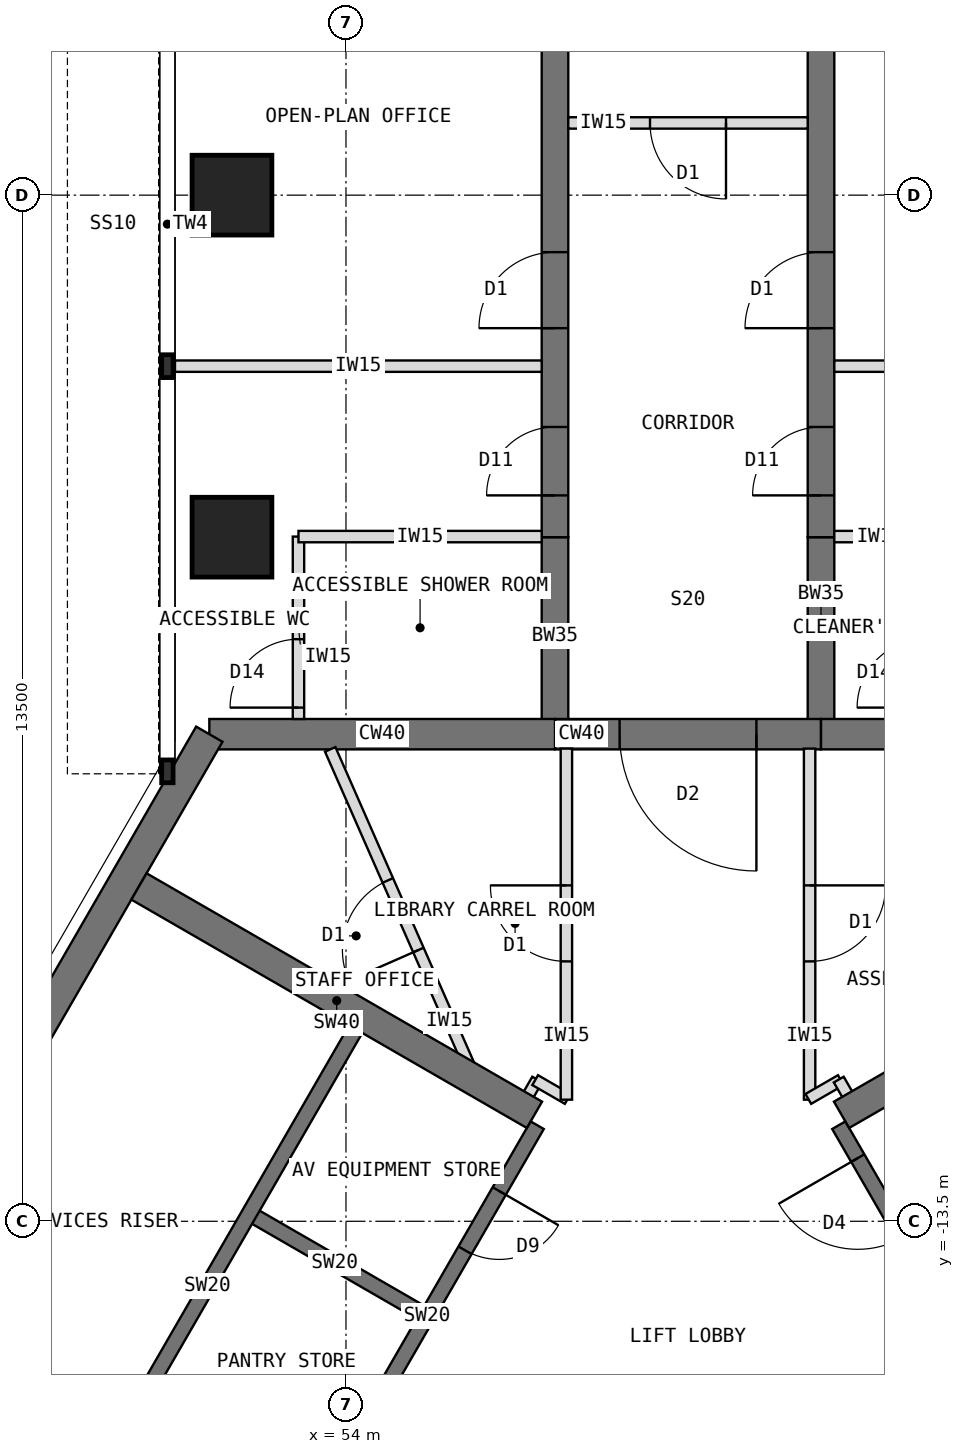
"""IFC4 building model, lengths in metres.
Left out: names, types, materials, properties, quantities, classifications, styles, units other than length and angle.
Written with IfcOpenShell. Run it as: python <this file> out.ifc"""

import sys

from ifc_helpers import new_model, si_unit, direction, frame, frame_2d, origin, origin_2d, place, context, subcontext, project, spatial, rectangle, extrude, element, fill, save


model = new_model("IFC4")
c1 = context("Model", 3, precision=1e-05, world=origin(), true_north=direction((0.0, 1.0)))
c2 = subcontext(c1, "Body", "Model", "MODEL_VIEW")
j1 = project(units=[si_unit("LENGTHUNIT", "METRE"), si_unit("PLANEANGLEUNIT", "RADIAN")], contexts=[c1])
p1 = place(None, origin())
s1 = spatial("IfcSite", under=j1, at=p1, CompositionType="ELEMENT")
p2 = place(p1, origin())
s2 = spatial("IfcBuilding", under=s1, at=p2, CompositionType="ELEMENT")
p3 = place(p2, frame((0.0, 0.0, 255.5)))
s3 = spatial("IfcBuildingStorey", under=s2, at=p3, CompositionType="ELEMENT", Elevation=255.5)
p4 = place(p3, frame((64.798, -7.092, 0.0), z_axis=(0.0, 0.0, 1.0), x_axis=(-1.0, 0.0, 0.0)))
e1 = element("IfcWall", 1, at=p4, inside=s3, PredefinedType="SHEAR", context=c2, shape_type="SweptSolid", body=[
    extrude(rectangle(XDim=4.548, YDim=0.4, at=frame_2d((2.274, 0.0))), origin(), (0.0, 0.0, 1.0), 4.0),
])
p5 = place(p3, frame((60.25, -7.092, 0.0), z_axis=(0.0, 0.0, 1.0), x_axis=(-1.0, 0.0, 0.0)))
e2 = element("IfcWall", 2, at=p5, inside=s3, PredefinedType="SHEAR", context=c2, shape_type="SweptSolid", body=[
    extrude(rectangle(XDim=3.5, YDim=0.4, at=frame_2d((1.75, 0.0))), origin(), (0.0, 0.0, 1.0), 4.0),
])
p6 = place(p5, frame((0.85, 0.0, 0.0)))
e3 = element("IfcOpeningElement", 3, at=p6, cuts=e2, PredefinedType="OPENING", context=c2, shape_type="SweptSolid", body=[
    extrude(rectangle(XDim=1.8, YDim=2.1, at=frame_2d((0.9, 1.05))), frame((0.0, 0.21, 0.0), z_axis=(0.0, -1.0, 0.0), x_axis=(1.0, 0.0, 0.0)), (0.0, 0.0, 1.0), 0.42),
])
p7 = place(p3, frame((56.75, -7.092, 0.0), z_axis=(0.0, 0.0, 1.0), x_axis=(-1.0, 0.0, 0.0)))
e4 = element("IfcWall", 4, at=p7, inside=s3, PredefinedType="SHEAR", context=c2, shape_type="SweptSolid", body=[
    extrude(rectangle(XDim=4.548, YDim=0.4, at=frame_2d((2.274, 0.0))), origin(), (0.0, 0.0, 1.0), 4.0),
])
p8 = place(p3, frame((52.202, -7.092, 0.0), z_axis=(0.0, 0.0, 1.0), x_axis=(-0.500005998175, -0.866021940709, 0.0)))
e5 = element("IfcWall", 5, at=p8, inside=s3, PredefinedType="SHEAR", context=c2, shape_type="SweptSolid", body=[
    extrude(rectangle(XDim=12.596, YDim=0.4, at=frame_2d((6.298, 0.0))), origin(), (0.0, 0.0, 1.0), 4.0),
])
p9 = place(p3, frame((56.75, -7.092, 0.0), z_axis=(0.0, 0.0, 1.0), x_axis=(0.0, 1.0, 0.0)))
e6 = element("IfcWall", 6, at=p9, inside=s3, PredefinedType="SHEAR", context=c2, shape_type="SweptSolid", body=[
    extrude(rectangle(XDim=2.592, YDim=0.35, at=frame_2d((1.296, 0.0))), origin(), (0.0, 0.0, 1.0), 4.0),
])
p10 = place(p3, frame((56.75, -4.5, 0.0), z_axis=(0.0, 0.0, 1.0), x_axis=(0.0, 1.0, 0.0)))
e7 = element("IfcWall", 7, at=p10, inside=s3, PredefinedType="SHEAR", context=c2, shape_type="SweptSolid", body=[
    extrude(rectangle(XDim=13.2, YDim=0.35, at=frame_2d((6.6, 0.0))), origin(), (0.0, 0.0, 1.0), 4.0),
])
p11 = place(p10, frame((0.55, 0.0, 0.0)))
e8 = element("IfcOpeningElement", 8, at=p11, cuts=e7, PredefinedType="OPENING", context=c2, shape_type="SweptSolid", body=[
    extrude(rectangle(XDim=0.9, YDim=2.1, at=frame_2d((0.45, 1.05))), frame((0.0, 0.185, 0.0), z_axis=(0.0, -1.0, 0.0), x_axis=(1.0, 0.0, 0.0)), (0.0, 0.0, 1.0), 0.37),
])
p12 = place(p10, frame((2.75, 0.0, 0.0)))
e9 = element("IfcOpeningElement", 9, at=p12, cuts=e7, PredefinedType="OPENING", context=c2, shape_type="SweptSolid", body=[
    extrude(rectangle(XDim=1.0, YDim=2.1, at=frame_2d((0.5, 1.05))), frame((0.0, 0.185, 0.0), z_axis=(0.0, -1.0, 0.0), x_axis=(1.0, 0.0, 0.0)), (0.0, 0.0, 1.0), 0.37),
])
p13 = place(p3, frame((60.25, -7.092, 0.0), z_axis=(0.0, 0.0, 1.0), x_axis=(0.0, 1.0, 0.0)))
e10 = element("IfcWall", 10, at=p13, inside=s3, PredefinedType="SHEAR", context=c2, shape_type="SweptSolid", body=[
    extrude(rectangle(XDim=2.592, YDim=0.35, at=frame_2d((1.296, 0.0))), origin(), (0.0, 0.0, 1.0), 4.0),
])
p14 = place(p3, frame((60.25, -4.5, 0.0), z_axis=(0.0, 0.0, 1.0), x_axis=(0.0, 1.0, 0.0)))
e11 = element("IfcWall", 11, at=p14, inside=s3, PredefinedType="SHEAR", context=c2, shape_type="SweptSolid", body=[
    extrude(rectangle(XDim=13.2, YDim=0.35, at=frame_2d((6.6, 0.0))), origin(), (0.0, 0.0, 1.0), 4.0),
])
p15 = place(p14, frame((0.55, 0.0, 0.0)))
e12 = element("IfcOpeningElement", 12, at=p15, cuts=e11, PredefinedType="OPENING", context=c2, shape_type="SweptSolid", body=[
    extrude(rectangle(XDim=0.9, YDim=2.1, at=frame_2d((0.45, 1.05))), frame((0.0, 0.185, 0.0), z_axis=(0.0, -1.0, 0.0), x_axis=(1.0, 0.0, 0.0)), (0.0, 0.0, 1.0), 0.37),
])
p16 = place(p14, frame((2.75, 0.0, 0.0)))
e13 = element("IfcOpeningElement", 13, at=p16, cuts=e11, PredefinedType="OPENING", context=c2, shape_type="SweptSolid", body=[
    extrude(rectangle(XDim=1.0, YDim=2.1, at=frame_2d((0.5, 1.05))), frame((0.0, 0.185, 0.0), z_axis=(0.0, -1.0, 0.0), x_axis=(1.0, 0.0, 0.0)), (0.0, 0.0, 1.0), 0.37),
])
for number, where, z_axis, x_axis in (
    (14, (52.5, -4.5, 0.0), (0.0, 0.0, 1.0), (1.0, 0.0, 0.0)),
    (15, (52.5, 0.0, 0.0), (0.0, 0.0, 1.0), (1.0, 0.0, 0.0)),
):
    element("IfcColumn", number, at=place(p3, frame(where, z_axis=z_axis, x_axis=x_axis)), inside=s3, PredefinedType="COLUMN", context=c2, shape_type="SweptSolid", body=[
        extrude(rectangle(XDim=1.05, YDim=1.05, at=origin_2d()), origin(), (0.0, 0.0, 1.0), 4.0),
    ])
p17 = place(p3, frame((56.516, -12.236, 0.0), z_axis=(0.0, 0.0, 1.0), x_axis=(-0.49999894854, -0.866026010844, 0.0)))
e16 = element("IfcWall", 16, at=p17, inside=s3, PredefinedType="SHEAR", context=c2, shape_type="SweptSolid", body=[
    extrude(rectangle(XDim=8.0, YDim=0.2, at=frame_2d((4.0, 0.0))), origin(), (0.0, 0.0, 1.0), 4.0),
])
p18 = place(p17, frame((6.3, 0.0, 0.0)))
e17 = element("IfcOpeningElement", 17, at=p18, cuts=e16, PredefinedType="OPENING", context=c2, shape_type="SweptSolid", body=[
    extrude(rectangle(XDim=1.2, YDim=2.1, at=frame_2d((0.6, 1.05))), frame((0.0, 0.11, 0.0), z_axis=(0.0, -1.0, 0.0), x_axis=(1.0, 0.0, 0.0)), (0.0, 0.0, 1.0), 0.22),
])
p19 = place(p17, frame((1.0, 0.0, 0.0)))
e18 = element("IfcOpeningElement", 18, at=p19, cuts=e16, PredefinedType="OPENING", context=c2, shape_type="SweptSolid", body=[
    extrude(rectangle(XDim=0.9, YDim=2.1, at=frame_2d((0.45, 1.05))), frame((0.0, 0.11, 0.0), z_axis=(0.0, -1.0, 0.0), x_axis=(1.0, 0.0, 0.0)), (0.0, 0.0, 1.0), 0.22),
])
p20 = place(p17, frame((3.9, 0.0, 0.0)))
e19 = element("IfcOpeningElement", 19, at=p20, cuts=e16, PredefinedType="OPENING", context=c2, shape_type="SweptSolid", body=[
    extrude(rectangle(XDim=0.9, YDim=2.1, at=frame_2d((0.45, 1.05))), frame((0.0, 0.11, 0.0), z_axis=(0.0, -1.0, 0.0), x_axis=(1.0, 0.0, 0.0)), (0.0, 0.0, 1.0), 0.22),
])
p21 = place(p3, frame((54.98, -14.697, 0.0), z_axis=(0.0, 0.0, 1.0), x_axis=(-0.866062058628, 0.499936506574, 0.0)))
e20 = element("IfcWall", 20, at=p21, inside=s3, PredefinedType="SHEAR", context=c2, shape_type="SweptSolid", body=[
    extrude(rectangle(XDim=2.6, YDim=0.2, at=frame_2d((1.3, 0.0))), origin(), (0.0, 0.0, 1.0), 4.0),
])
p22 = place(p3, frame((54.178, -10.886, 0.0), z_axis=(0.0, 0.0, 1.0), x_axis=(-0.49999894854, -0.866026010844, 0.0)))
e21 = element("IfcWall", 21, at=p22, inside=s3, PredefinedType="SHEAR", context=c2, shape_type="SweptSolid", body=[
    extrude(rectangle(XDim=8.0, YDim=0.2, at=frame_2d((4.0, 0.0))), origin(), (0.0, 0.0, 1.0), 4.0),
])
p23 = place(p22, frame((6.8, 0.0, 0.0)))
e22 = element("IfcOpeningElement", 22, at=p23, cuts=e21, PredefinedType="OPENING", context=c2, shape_type="SweptSolid", body=[
    extrude(rectangle(XDim=0.9, YDim=2.1, at=frame_2d((0.45, 1.05))), frame((0.0, 0.11, 0.0), z_axis=(0.0, -1.0, 0.0), x_axis=(1.0, 0.0, 0.0)), (0.0, 0.0, 1.0), 0.22),
])
p24 = place(p3, frame((56.48, -12.099, 0.0), z_axis=(0.0, 0.0, 1.0), x_axis=(-0.866026570101, 0.499997979876, 0.0)))
e23 = element("IfcWall", 23, at=p24, inside=s3, PredefinedType="SHEAR", context=c2, shape_type="SweptSolid", body=[
    extrude(rectangle(XDim=6.008, YDim=0.4, at=frame_2d((3.004, 0.0))), origin(), (0.0, 0.0, 1.0), 4.0),
])
p25 = place(p3, frame((64.484, -19.164, 0.0), z_axis=(0.0, 0.0, 1.0), x_axis=(-0.49999894854, 0.866026010844, 0.0)))
e24 = element("IfcWall", 24, at=p25, inside=s3, PredefinedType="SHEAR", context=c2, shape_type="SweptSolid", body=[
    extrude(rectangle(XDim=8.0, YDim=0.2, at=frame_2d((4.0, 0.0))), origin(), (0.0, 0.0, 1.0), 4.0),
])
p26 = place(p25, frame((6.3, 0.0, 0.0)))
e25 = element("IfcOpeningElement", 25, at=p26, cuts=e24, PredefinedType="OPENING", context=c2, shape_type="SweptSolid", body=[
    extrude(rectangle(XDim=1.2, YDim=2.1, at=frame_2d((0.6, 1.05))), frame((0.0, 0.11, 0.0), z_axis=(0.0, -1.0, 0.0), x_axis=(1.0, 0.0, 0.0)), (0.0, 0.0, 1.0), 0.22),
])
p27 = place(p25, frame((0.9, 0.0, 0.0)))
e26 = element("IfcOpeningElement", 26, at=p27, cuts=e24, PredefinedType="OPENING", context=c2, shape_type="SweptSolid", body=[
    extrude(rectangle(XDim=1.1, YDim=2.2, at=frame_2d((0.55, 1.1))), frame((0.0, 0.11, 0.0), z_axis=(0.0, -1.0, 0.0), x_axis=(1.0, 0.0, 0.0)), (0.0, 0.0, 1.0), 0.22),
])
p28 = place(p25, frame((3.8, 0.0, 0.0)))
e27 = element("IfcOpeningElement", 27, at=p28, cuts=e24, PredefinedType="OPENING", context=c2, shape_type="SweptSolid", body=[
    extrude(rectangle(XDim=1.1, YDim=2.2, at=frame_2d((0.55, 1.1))), frame((0.0, 0.11, 0.0), z_axis=(0.0, -1.0, 0.0), x_axis=(1.0, 0.0, 0.0)), (0.0, 0.0, 1.0), 0.22),
])
p29 = place(p3, frame((60.52, -12.099, 0.0), z_axis=(0.0, 0.0, 1.0), x_axis=(0.866026570101, 0.499997979876, 0.0)))
e28 = element("IfcWall", 28, at=p29, inside=s3, PredefinedType="SHEAR", context=c2, shape_type="SweptSolid", body=[
    extrude(rectangle(XDim=6.008, YDim=0.4, at=frame_2d((3.004, 0.0))), origin(), (0.0, 0.0, 1.0), 4.0),
])
p30 = place(p3, frame((56.575, -2.25, 0.0), z_axis=(0.0, 0.0, 1.0), x_axis=(-1.0, 0.0, 0.0)))
e29 = element("IfcWall", 29, at=p30, inside=s3, PredefinedType="PARTITIONING", context=c2, shape_type="SweptSolid", body=[
    extrude(rectangle(XDim=4.825, YDim=0.15, at=frame_2d((2.413, 0.0))), origin(), (0.0, 0.0, 1.0), 3.8),
])
p31 = place(p3, frame((53.375, -6.892, 0.0), z_axis=(0.0, 0.0, 1.0), x_axis=(0.0, 1.0, 0.0)))
e30 = element("IfcWall", 30, at=p31, inside=s3, PredefinedType="PARTITIONING", context=c2, shape_type="SweptSolid", body=[
    extrude(rectangle(XDim=2.4, YDim=0.15, at=frame_2d((1.2, 0.0))), origin(), (0.0, 0.0, 1.0), 3.8),
])
p32 = place(p31, frame((0.15, 0.0, 0.0)))
e31 = element("IfcOpeningElement", 31, at=p32, cuts=e30, PredefinedType="OPENING", context=c2, shape_type="SweptSolid", body=[
    extrude(rectangle(XDim=0.9, YDim=2.1, at=frame_2d((0.45, 1.05))), frame((0.0, 0.085, 0.0), z_axis=(0.0, -1.0, 0.0), x_axis=(1.0, 0.0, 0.0)), (0.0, 0.0, 1.0), 0.17),
])
p33 = place(p3, frame((56.575, -4.492, 0.0), z_axis=(0.0, 0.0, 1.0), x_axis=(-1.0, 0.0, 0.0)))
e32 = element("IfcWall", 32, at=p33, inside=s3, PredefinedType="PARTITIONING", context=c2, shape_type="SweptSolid", body=[
    extrude(rectangle(XDim=3.2, YDim=0.15, at=frame_2d((1.6, 0.0))), origin(), (0.0, 0.0, 1.0), 3.267),
])
p34 = place(p3, frame((60.425, -2.25, 0.0), z_axis=(0.0, 0.0, 1.0), x_axis=(1.0, 0.0, 0.0)))
e33 = element("IfcWall", 33, at=p34, inside=s3, PredefinedType="PARTITIONING", context=c2, shape_type="SweptSolid", body=[
    extrude(rectangle(XDim=4.825, YDim=0.15, at=frame_2d((2.413, 0.0))), origin(), (0.0, 0.0, 1.0), 3.8),
])
p35 = place(p3, frame((60.425, -4.492, 0.0), z_axis=(0.0, 0.0, 1.0), x_axis=(1.0, 0.0, 0.0)))
e34 = element("IfcWall", 34, at=p35, inside=s3, PredefinedType="PARTITIONING", context=c2, shape_type="SweptSolid", body=[
    extrude(rectangle(XDim=1.2, YDim=0.15, at=frame_2d((0.6, 0.0))), origin(), (0.0, 0.0, 1.0), 3.267),
])
p36 = place(p3, frame((56.302, -12.008, 0.0), z_axis=(0.0, 0.0, 1.0), x_axis=(0.500230298122, 0.865892400268, 0.0)))
e35 = element("IfcWall", 35, at=p36, inside=s3, PredefinedType="PARTITIONING", context=c2, shape_type="SweptSolid", body=[
    extrude(rectangle(XDim=0.43, YDim=0.15, at=frame_2d((0.215, 0.0))), origin(), (0.0, 0.0, 1.0), 3.8),
])
p37 = place(p3, frame((56.489, -11.643, 0.0), z_axis=(0.0, 0.0, 1.0), x_axis=(0.865831790172, -0.50033519877, 0.0)))
e36 = element("IfcWall", 36, at=p37, inside=s3, PredefinedType="PARTITIONING", context=c2, shape_type="SweptSolid", body=[
    extrude(rectangle(XDim=0.494, YDim=0.15, at=frame_2d((0.247, 0.0))), origin(), (0.0, 0.0, 1.0), 3.8),
])
p38 = place(p3, frame((56.9, -11.9, 0.0), z_axis=(0.0, 0.0, 1.0), x_axis=(0.0, 1.0, 0.0)))
e37 = element("IfcWall", 37, at=p38, inside=s3, PredefinedType="PARTITIONING", context=c2, shape_type="SweptSolid", body=[
    extrude(rectangle(XDim=4.618, YDim=0.15, at=frame_2d((2.309, 0.0))), origin(), (0.0, 0.0, 1.0), 3.8),
])
p39 = place(p38, frame((1.819, 0.0, 0.0)))
e38 = element("IfcOpeningElement", 38, at=p39, cuts=e37, PredefinedType="OPENING", context=c2, shape_type="SweptSolid", body=[
    extrude(rectangle(XDim=1.0, YDim=2.1, at=frame_2d((0.5, 1.05))), frame((0.0, 0.085, 0.0), z_axis=(0.0, -1.0, 0.0), x_axis=(1.0, 0.0, 0.0)), (0.0, 0.0, 1.0), 0.17),
])
p40 = place(p3, frame((60.1, -7.282, 0.0), z_axis=(0.0, 0.0, 1.0), x_axis=(0.0, -1.0, 0.0)))
e39 = element("IfcWall", 39, at=p40, inside=s3, PredefinedType="PARTITIONING", context=c2, shape_type="SweptSolid", body=[
    extrude(rectangle(XDim=4.618, YDim=0.15, at=frame_2d((2.309, 0.0))), origin(), (0.0, 0.0, 1.0), 3.8),
])
p41 = place(p40, frame((1.799, 0.0, 0.0)))
e40 = element("IfcOpeningElement", 40, at=p41, cuts=e39, PredefinedType="OPENING", context=c2, shape_type="SweptSolid", body=[
    extrude(rectangle(XDim=1.0, YDim=2.1, at=frame_2d((0.5, 1.05))), frame((0.0, 0.085, 0.0), z_axis=(0.0, -1.0, 0.0), x_axis=(1.0, 0.0, 0.0)), (0.0, 0.0, 1.0), 0.17),
])
p42 = place(p3, frame((60.083, -11.89, 0.0), z_axis=(0.0, 0.0, 1.0), x_axis=(0.865831790172, 0.50033519877, 0.0)))
e41 = element("IfcWall", 41, at=p42, inside=s3, PredefinedType="PARTITIONING", context=c2, shape_type="SweptSolid", body=[
    extrude(rectangle(XDim=0.494, YDim=0.15, at=frame_2d((0.247, 0.0))), origin(), (0.0, 0.0, 1.0), 3.8),
])
p43 = place(p3, frame((60.483, -11.635, 0.0), z_axis=(0.0, 0.0, 1.0), x_axis=(0.500230298122, -0.865892400268, 0.0)))
e42 = element("IfcWall", 42, at=p43, inside=s3, PredefinedType="PARTITIONING", context=c2, shape_type="SweptSolid", body=[
    extrude(rectangle(XDim=0.43, YDim=0.15, at=frame_2d((0.215, 0.0))), origin(), (0.0, 0.0, 1.0), 3.8),
])
p44 = place(p3, frame((55.711, -11.656, 0.0), z_axis=(0.0, 0.0, 1.0), x_axis=(-0.402457111937, 0.915438841787, 0.0)))
e43 = element("IfcWall", 43, at=p44, inside=s3, PredefinedType="PARTITIONING", context=c2, shape_type="SweptSolid", body=[
    extrude(rectangle(XDim=4.767, YDim=0.15, at=frame_2d((2.383, 0.0))), origin(), (0.0, 0.0, 1.0), 3.8),
])
p45 = place(p44, frame((1.883, 0.0, 0.0)))
e44 = element("IfcOpeningElement", 44, at=p45, cuts=e43, PredefinedType="OPENING", context=c2, shape_type="SweptSolid", body=[
    extrude(rectangle(XDim=1.0, YDim=2.1, at=frame_2d((0.5, 1.05))), frame((0.0, 0.085, 0.0), z_axis=(0.0, -1.0, 0.0), x_axis=(1.0, 0.0, 0.0)), (0.0, 0.0, 1.0), 0.17),
])
p46 = place(p3, frame((60.075, 0.95, 0.0), z_axis=(0.0, 0.0, 1.0), x_axis=(-1.0, 0.0, 0.0)))
e45 = element("IfcWall", 45, at=p46, inside=s3, PredefinedType="PARTITIONING", context=c2, shape_type="SweptSolid", body=[
    extrude(rectangle(XDim=3.15, YDim=0.15, at=frame_2d((1.575, 0.0))), origin(), (0.0, 0.0, 1.0), 3.8),
])
p47 = place(p46, frame((1.075, 0.0, 0.0)))
e46 = element("IfcOpeningElement", 46, at=p47, cuts=e45, PredefinedType="OPENING", context=c2, shape_type="SweptSolid", body=[
    extrude(rectangle(XDim=1.0, YDim=2.1, at=frame_2d((0.5, 1.05))), frame((0.0, 0.085, 0.0), z_axis=(0.0, -1.0, 0.0), x_axis=(1.0, 0.0, 0.0)), (0.0, 0.0, 1.0), 0.17),
])
p48 = place(p26, origin())
e47 = element("IfcDoor", 47, at=p48, inside=s3, OperationType="SINGLE_SWING_RIGHT", PredefinedType="DOOR", context=c2, shape_type="SweptSolid", body=[
    extrude(rectangle(XDim=1.2, YDim=2.1, at=frame_2d((0.6, 1.05))), frame((0.0, 0.025, 0.0), z_axis=(0.0, -1.0, 0.0), x_axis=(1.0, 0.0, 0.0)), (0.0, 0.0, 1.0), 0.05),
])
fill(e25, e47)
p49 = place(p6, origin())
e48 = element("IfcDoor", 48, at=p49, inside=s3, OperationType="DOUBLE_DOOR_DOUBLE_SWING", PredefinedType="DOOR", context=c2, shape_type="SweptSolid", body=[
    extrude(rectangle(XDim=1.8, YDim=2.1, at=frame_2d((0.9, 1.05))), frame((0.0, 0.025, 0.0), z_axis=(0.0, -1.0, 0.0), x_axis=(1.0, 0.0, 0.0)), (0.0, 0.0, 1.0), 0.05),
])
fill(e3, e48)
p50 = place(p32, origin())
e49 = element("IfcDoor", 49, at=p50, inside=s3, OperationType="SINGLE_SWING_LEFT", PredefinedType="DOOR", context=c2, shape_type="SweptSolid", body=[
    extrude(rectangle(XDim=0.9, YDim=2.1, at=frame_2d((0.45, 1.05))), frame((0.0, 0.025, 0.0), z_axis=(0.0, -1.0, 0.0), x_axis=(1.0, 0.0, 0.0)), (0.0, 0.0, 1.0), 0.05),
])
fill(e31, e49)
p51 = place(p41, origin())
e50 = element("IfcDoor", 50, at=p51, inside=s3, OperationType="SINGLE_SWING_LEFT", PredefinedType="DOOR", context=c2, shape_type="SweptSolid", body=[
    extrude(rectangle(XDim=1.0, YDim=2.1, at=frame_2d((0.5, 1.05))), frame((0.0, 0.025, 0.0), z_axis=(0.0, -1.0, 0.0), x_axis=(1.0, 0.0, 0.0)), (0.0, 0.0, 1.0), 0.05),
])
fill(e40, e50)
p52 = place(p45, origin())
e51 = element("IfcDoor", 51, at=p52, inside=s3, OperationType="SINGLE_SWING_LEFT", PredefinedType="DOOR", context=c2, shape_type="SweptSolid", body=[
    extrude(rectangle(XDim=1.0, YDim=2.1, at=frame_2d((0.5, 1.05))), frame((0.0, 0.025, 0.0), z_axis=(0.0, -1.0, 0.0), x_axis=(1.0, 0.0, 0.0)), (0.0, 0.0, 1.0), 0.05),
])
fill(e44, e51)
p53 = place(p39, origin())
e52 = element("IfcDoor", 52, at=p53, inside=s3, OperationType="SINGLE_SWING_RIGHT", PredefinedType="DOOR", context=c2, shape_type="SweptSolid", body=[
    extrude(rectangle(XDim=1.0, YDim=2.1, at=frame_2d((0.5, 1.05))), frame((0.0, 0.025, 0.0), z_axis=(0.0, -1.0, 0.0), x_axis=(1.0, 0.0, 0.0)), (0.0, 0.0, 1.0), 0.05),
])
fill(e38, e52)
p54 = place(p47, origin())
e53 = element("IfcDoor", 53, at=p54, inside=s3, OperationType="SINGLE_SWING_LEFT", PredefinedType="DOOR", context=c2, shape_type="SweptSolid", body=[
    extrude(rectangle(XDim=1.0, YDim=2.1, at=frame_2d((0.5, 1.05))), frame((0.0, 0.025, 0.0), z_axis=(0.0, -1.0, 0.0), x_axis=(1.0, 0.0, 0.0)), (0.0, 0.0, 1.0), 0.05),
])
fill(e46, e53)
p55 = place(p11, origin())
e54 = element("IfcDoor", 54, at=p55, inside=s3, OperationType="SINGLE_SWING_LEFT", PredefinedType="DOOR", context=c2, shape_type="SweptSolid", body=[
    extrude(rectangle(XDim=0.9, YDim=2.1, at=frame_2d((0.45, 1.05))), frame((0.0, 0.025, 0.0), z_axis=(0.0, -1.0, 0.0), x_axis=(1.0, 0.0, 0.0)), (0.0, 0.0, 1.0), 0.05),
])
fill(e8, e54)
p56 = place(p12, origin())
e55 = element("IfcDoor", 55, at=p56, inside=s3, OperationType="SINGLE_SWING_LEFT", PredefinedType="DOOR", context=c2, shape_type="SweptSolid", body=[
    extrude(rectangle(XDim=1.0, YDim=2.1, at=frame_2d((0.5, 1.05))), frame((0.0, 0.025, 0.0), z_axis=(0.0, -1.0, 0.0), x_axis=(1.0, 0.0, 0.0)), (0.0, 0.0, 1.0), 0.05),
])
fill(e9, e55)
p57 = place(p15, origin())
e56 = element("IfcDoor", 56, at=p57, inside=s3, OperationType="SINGLE_SWING_LEFT", PredefinedType="DOOR", context=c2, shape_type="SweptSolid", body=[
    extrude(rectangle(XDim=0.9, YDim=2.1, at=frame_2d((0.45, 1.05))), frame((0.0, 0.025, 0.0), z_axis=(0.0, -1.0, 0.0), x_axis=(1.0, 0.0, 0.0)), (0.0, 0.0, 1.0), 0.05),
])
fill(e12, e56)
p58 = place(p16, origin())
e57 = element("IfcDoor", 57, at=p58, inside=s3, OperationType="SINGLE_SWING_LEFT", PredefinedType="DOOR", context=c2, shape_type="SweptSolid", body=[
    extrude(rectangle(XDim=1.0, YDim=2.1, at=frame_2d((0.5, 1.05))), frame((0.0, 0.025, 0.0), z_axis=(0.0, -1.0, 0.0), x_axis=(1.0, 0.0, 0.0)), (0.0, 0.0, 1.0), 0.05),
])
fill(e13, e57)
p59 = place(p19, origin())
e58 = element("IfcDoor", 58, at=p59, inside=s3, OperationType="SINGLE_SWING_LEFT", PredefinedType="DOOR", context=c2, shape_type="SweptSolid", body=[
    extrude(rectangle(XDim=0.9, YDim=2.1, at=frame_2d((0.45, 1.05))), frame((0.0, 0.025, 0.0), z_axis=(0.0, -1.0, 0.0), x_axis=(1.0, 0.0, 0.0)), (0.0, 0.0, 1.0), 0.05),
])
fill(e18, e58)
save(model, sys.argv[1])
